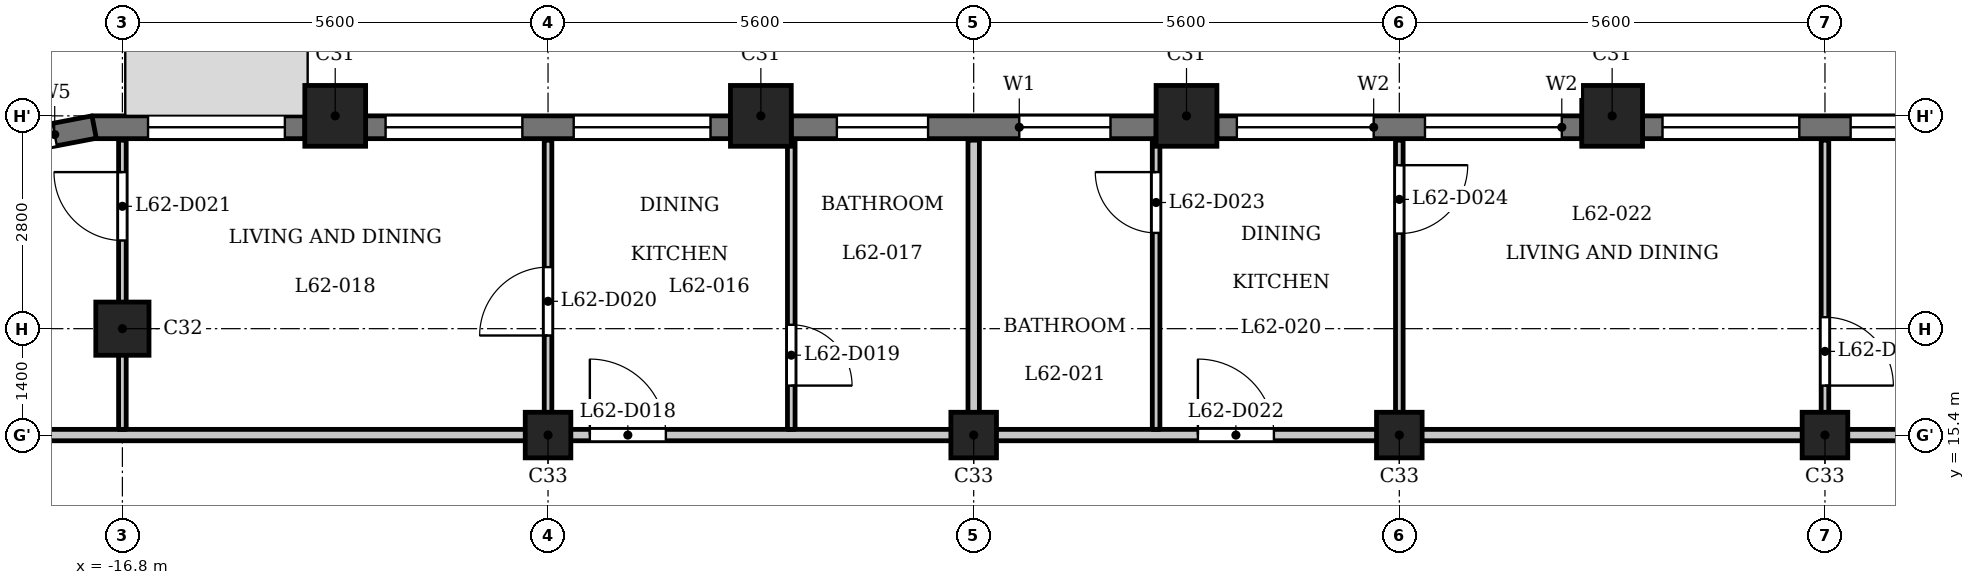
"""IFC4 building model, lengths in metres.
Left out: names, types, materials, properties, quantities, classifications, styles, units other than length and angle.
Written with IfcOpenShell. Run it as: python <this file> out.ifc"""

import sys

from ifc_helpers import new_model, si_unit, direction, frame, frame_2d, origin, origin_2d, place, context, subcontext, project, spatial, rectangle, extrude, element, fill, save


model = new_model("IFC4")
c1 = context("Model", 3, precision=1e-05, world=origin(), true_north=direction((0.0, 1.0)))
c2 = subcontext(c1, "Body", "Model", "MODEL_VIEW")
j1 = project(units=[si_unit("LENGTHUNIT", "METRE"), si_unit("PLANEANGLEUNIT", "RADIAN")], contexts=[c1])
p1 = place(None, origin())
s1 = spatial("IfcSite", under=j1, at=p1, CompositionType="ELEMENT")
p2 = place(p1, origin())
s2 = spatial("IfcBuilding", under=s1, at=p2, CompositionType="ELEMENT")
p3 = place(p2, frame((0.0, 0.0, 241.7)))
s3 = spatial("IfcBuildingStorey", under=s2, at=p3, CompositionType="ELEMENT", Elevation=241.7)
for number, where, z_axis, x_axis in (
    (1, (2.8, 19.6, 0.0), (0.0, 0.0, 1.0), (1.0, 0.0, 0.0)),
    (2, (-2.8, 19.6, 0.0), (0.0, 0.0, 1.0), (1.0, 0.0, 0.0)),
    (3, (-8.4, 19.6, 0.0), (0.0, 0.0, 1.0), (1.0, 0.0, 0.0)),
    (4, (-14.0, 19.6, 0.0), (0.0, 0.0, 1.0), (1.0, 0.0, 0.0)),
):
    element("IfcColumn", number, at=place(p3, frame(where, z_axis=z_axis, x_axis=x_axis)), inside=s3, PredefinedType="COLUMN", context=c2, shape_type="SweptSolid", body=[
        extrude(rectangle(XDim=0.8, YDim=0.8, at=origin_2d()), origin(), (0.0, 0.0, 1.0), 3.5),
    ])
p4 = place(p3, frame((-16.8, 16.8, 0.0), z_axis=(0.0, 0.0, 1.0), x_axis=(1.0, 0.0, 0.0)))
e5 = element("IfcColumn", 5, at=p4, inside=s3, PredefinedType="COLUMN", context=c2, shape_type="SweptSolid", body=[
    extrude(rectangle(XDim=0.7, YDim=0.7, at=origin_2d()), origin(), (0.0, 0.0, 1.0), 3.5),
])
for number, where, z_axis, x_axis in (
    (6, (-11.2, 15.4, 0.0), (0.0, 0.0, 1.0), (1.0, 0.0, 0.0)),
    (7, (-5.6, 15.4, 0.0), (0.0, 0.0, 1.0), (1.0, 0.0, 0.0)),
    (8, (0.0, 15.4, 0.0), (0.0, 0.0, 1.0), (1.0, 0.0, 0.0)),
    (9, (5.6, 15.4, 0.0), (0.0, 0.0, 1.0), (1.0, 0.0, 0.0)),
):
    element("IfcColumn", number, at=place(p3, frame(where, z_axis=z_axis, x_axis=x_axis)), inside=s3, PredefinedType="COLUMN", context=c2, shape_type="SweptSolid", body=[
        extrude(rectangle(XDim=0.6, YDim=0.6, at=origin_2d()), origin(), (0.0, 0.0, 1.0), 3.5),
    ])
p5 = place(p3, frame((8.0, 19.45, 0.0), z_axis=(0.0, 0.0, 1.0), x_axis=(-1.0, 0.0, 0.0)))
e10 = element("IfcWall", 10, at=p5, inside=s3, PredefinedType="SOLIDWALL", context=c2, shape_type="SweptSolid", body=[
    extrude(rectangle(XDim=4.8, YDim=0.3, at=frame_2d((2.4, 0.0))), origin(), (0.0, 0.0, 1.0), 2.55),
])
p6 = place(p5, frame((0.262, 0.0, 0.9)))
e11 = element("IfcOpeningElement", 11, at=p6, cuts=e10, PredefinedType="OPENING", context=c2, shape_type="SweptSolid", body=[
    extrude(rectangle(XDim=1.8, YDim=1.25, at=frame_2d((0.9, 0.625))), frame((0.0, 0.16, 0.0), z_axis=(0.0, -1.0, 0.0), x_axis=(1.0, 0.0, 0.0)), (0.0, 0.0, 1.0), 0.32),
])
p7 = place(p5, frame((2.738, 0.0, 0.9)))
e12 = element("IfcOpeningElement", 12, at=p7, cuts=e10, PredefinedType="OPENING", context=c2, shape_type="SweptSolid", body=[
    extrude(rectangle(XDim=1.8, YDim=1.25, at=frame_2d((0.9, 0.625))), frame((0.0, 0.16, 0.0), z_axis=(0.0, -1.0, 0.0), x_axis=(1.0, 0.0, 0.0)), (0.0, 0.0, 1.0), 0.32),
])
p8 = place(p3, frame((2.4, 19.45, 0.0), z_axis=(0.0, 0.0, 1.0), x_axis=(-1.0, 0.0, 0.0)))
e13 = element("IfcWall", 13, at=p8, inside=s3, PredefinedType="SOLIDWALL", context=c2, shape_type="SweptSolid", body=[
    extrude(rectangle(XDim=4.8, YDim=0.3, at=frame_2d((2.4, 0.0))), origin(), (0.0, 0.0, 1.0), 2.55),
])
p9 = place(p8, frame((0.262, 0.0, 0.9)))
e14 = element("IfcOpeningElement", 14, at=p9, cuts=e13, PredefinedType="OPENING", context=c2, shape_type="SweptSolid", body=[
    extrude(rectangle(XDim=1.8, YDim=1.25, at=frame_2d((0.9, 0.625))), frame((0.0, 0.16, 0.0), z_axis=(0.0, -1.0, 0.0), x_axis=(1.0, 0.0, 0.0)), (0.0, 0.0, 1.0), 0.32),
])
p10 = place(p8, frame((2.738, 0.0, 0.9)))
e15 = element("IfcOpeningElement", 15, at=p10, cuts=e13, PredefinedType="OPENING", context=c2, shape_type="SweptSolid", body=[
    extrude(rectangle(XDim=1.8, YDim=1.25, at=frame_2d((0.9, 0.625))), frame((0.0, 0.16, 0.0), z_axis=(0.0, -1.0, 0.0), x_axis=(1.0, 0.0, 0.0)), (0.0, 0.0, 1.0), 0.32),
])
p11 = place(p3, frame((-3.2, 19.45, 0.0), z_axis=(0.0, 0.0, 1.0), x_axis=(-1.0, 0.0, 0.0)))
e16 = element("IfcWall", 16, at=p11, inside=s3, PredefinedType="SOLIDWALL", context=c2, shape_type="SweptSolid", body=[
    extrude(rectangle(XDim=4.8, YDim=0.3, at=frame_2d((2.4, 0.0))), origin(), (0.0, 0.0, 1.0), 2.55),
])
p12 = place(p11, frame((0.6, 0.0, 0.6)))
e17 = element("IfcOpeningElement", 17, at=p12, cuts=e16, PredefinedType="OPENING", context=c2, shape_type="SweptSolid", body=[
    extrude(rectangle(XDim=1.2, YDim=1.55, at=frame_2d((0.6, 0.775))), frame((0.0, 0.16, 0.0), z_axis=(0.0, -1.0, 0.0), x_axis=(1.0, 0.0, 0.0)), (0.0, 0.0, 1.0), 0.32),
])
p13 = place(p11, frame((3.0, 0.0, 0.6)))
e18 = element("IfcOpeningElement", 18, at=p13, cuts=e16, PredefinedType="OPENING", context=c2, shape_type="SweptSolid", body=[
    extrude(rectangle(XDim=1.2, YDim=1.55, at=frame_2d((0.6, 0.775))), frame((0.0, 0.16, 0.0), z_axis=(0.0, -1.0, 0.0), x_axis=(1.0, 0.0, 0.0)), (0.0, 0.0, 1.0), 0.32),
])
p14 = place(p3, frame((-8.8, 19.45, 0.0), z_axis=(0.0, 0.0, 1.0), x_axis=(-1.0, 0.0, 0.0)))
e19 = element("IfcWall", 19, at=p14, inside=s3, PredefinedType="SOLIDWALL", context=c2, shape_type="SweptSolid", body=[
    extrude(rectangle(XDim=4.8, YDim=0.3, at=frame_2d((2.4, 0.0))), origin(), (0.0, 0.0, 1.0), 2.55),
])
p15 = place(p14, frame((0.262, 0.0, 0.9)))
e20 = element("IfcOpeningElement", 20, at=p15, cuts=e19, PredefinedType="OPENING", context=c2, shape_type="SweptSolid", body=[
    extrude(rectangle(XDim=1.8, YDim=1.25, at=frame_2d((0.9, 0.625))), frame((0.0, 0.16, 0.0), z_axis=(0.0, -1.0, 0.0), x_axis=(1.0, 0.0, 0.0)), (0.0, 0.0, 1.0), 0.32),
])
p16 = place(p14, frame((2.738, 0.0, 0.9)))
e21 = element("IfcOpeningElement", 21, at=p16, cuts=e19, PredefinedType="OPENING", context=c2, shape_type="SweptSolid", body=[
    extrude(rectangle(XDim=1.8, YDim=1.25, at=frame_2d((0.9, 0.625))), frame((0.0, 0.16, 0.0), z_axis=(0.0, -1.0, 0.0), x_axis=(1.0, 0.0, 0.0)), (0.0, 0.0, 1.0), 0.32),
])
p17 = place(p3, frame((-14.4, 19.45, 0.0), z_axis=(0.0, 0.0, 1.0), x_axis=(-1.0, 0.0, 0.0)))
e22 = element("IfcWall", 22, at=p17, inside=s3, PredefinedType="SOLIDWALL", context=c2, shape_type="SweptSolid", body=[
    extrude(rectangle(XDim=2.8, YDim=0.3, at=frame_2d((1.4, 0.0))), origin(), (0.0, 0.0, 1.0), 2.55),
])
p18 = place(p17, frame((0.262, 0.0, 0.9)))
e23 = element("IfcOpeningElement", 23, at=p18, cuts=e22, PredefinedType="OPENING", context=c2, shape_type="SweptSolid", body=[
    extrude(rectangle(XDim=1.8, YDim=1.25, at=frame_2d((0.9, 0.625))), frame((0.0, 0.16, 0.0), z_axis=(0.0, -1.0, 0.0), x_axis=(1.0, 0.0, 0.0)), (0.0, 0.0, 1.0), 0.32),
])
p19 = place(p3, frame((-17.172, 19.453, 0.0), z_axis=(0.0, 0.0, 1.0), x_axis=(-0.982301706131, -0.187305520826, 0.0)))
e24 = element("IfcWall", 24, at=p19, inside=s3, PredefinedType="SOLIDWALL", context=c2, shape_type="SweptSolid", body=[
    extrude(rectangle(XDim=1.856, YDim=0.3, at=frame_2d((0.928, 0.0))), origin(), (0.0, 0.0, 1.0), 2.55),
])
p20 = place(p19, frame((0.528, 0.0, 0.6)))
e25 = element("IfcOpeningElement", 25, at=p20, cuts=e24, PredefinedType="OPENING", context=c2, shape_type="SweptSolid", body=[
    extrude(rectangle(XDim=0.8, YDim=1.55, at=frame_2d((0.4, 0.775))), frame((0.0, 0.16, 0.0), z_axis=(0.0, -1.0, 0.0), x_axis=(1.0, 0.0, 0.0)), (0.0, 0.0, 1.0), 0.32),
])
p21 = place(p3, frame((-23.55, 15.4, 0.0), z_axis=(0.0, 0.0, 1.0), x_axis=(1.0, 0.0, 0.0)))
e26 = element("IfcWall", 26, at=p21, inside=s3, PredefinedType="PARTITIONING", context=c2, shape_type="SweptSolid", body=[
    extrude(rectangle(XDim=46.872, YDim=0.15, at=frame_2d((23.436, 0.0))), origin(), (0.0, 0.0, 1.0), 3.2),
])
p22 = place(p21, frame((12.9, 0.0, 0.0)))
e27 = element("IfcOpeningElement", 27, at=p22, cuts=e26, PredefinedType="OPENING", context=c2, shape_type="SweptSolid", body=[
    extrude(rectangle(XDim=1.0, YDim=2.1, at=frame_2d((0.5, 1.05))), frame((0.0, 0.085, 0.0), z_axis=(0.0, -1.0, 0.0), x_axis=(1.0, 0.0, 0.0)), (0.0, 0.0, 1.0), 0.17),
])
p23 = place(p21, frame((20.9, 0.0, 0.0)))
e28 = element("IfcOpeningElement", 28, at=p23, cuts=e26, PredefinedType="OPENING", context=c2, shape_type="SweptSolid", body=[
    extrude(rectangle(XDim=1.0, YDim=2.1, at=frame_2d((0.5, 1.05))), frame((0.0, 0.085, 0.0), z_axis=(0.0, -1.0, 0.0), x_axis=(1.0, 0.0, 0.0)), (0.0, 0.0, 1.0), 0.17),
])
p24 = place(p21, frame((37.7, 0.0, 0.0)))
e29 = element("IfcOpeningElement", 29, at=p24, cuts=e26, PredefinedType="OPENING", context=c2, shape_type="SweptSolid", body=[
    extrude(rectangle(XDim=1.0, YDim=2.1, at=frame_2d((0.5, 1.05))), frame((0.0, 0.085, 0.0), z_axis=(0.0, -1.0, 0.0), x_axis=(1.0, 0.0, 0.0)), (0.0, 0.0, 1.0), 0.17),
])
p25 = place(p3, frame((-16.8, 15.475, 0.0), z_axis=(0.0, 0.0, 1.0), x_axis=(0.0, 1.0, 0.0)))
e30 = element("IfcWall", 30, at=p25, inside=s3, PredefinedType="PARTITIONING", context=c2, shape_type="SweptSolid", body=[
    extrude(rectangle(XDim=3.805, YDim=0.1, at=frame_2d((1.902, 0.0))), origin(), (0.0, 0.0, 1.0), 3.2),
])
p26 = place(p25, frame((2.485, 0.0, 0.0)))
e31 = element("IfcOpeningElement", 31, at=p26, cuts=e30, PredefinedType="OPENING", context=c2, shape_type="SweptSolid", body=[
    extrude(rectangle(XDim=0.9, YDim=2.1, at=frame_2d((0.45, 1.05))), frame((0.0, 0.06, 0.0), z_axis=(0.0, -1.0, 0.0), x_axis=(1.0, 0.0, 0.0)), (0.0, 0.0, 1.0), 0.12),
])
p27 = place(p3, frame((-11.2, 15.475, 0.0), z_axis=(0.0, 0.0, 1.0), x_axis=(0.0, 1.0, 0.0)))
e32 = element("IfcWall", 32, at=p27, inside=s3, PredefinedType="PARTITIONING", context=c2, shape_type="SweptSolid", body=[
    extrude(rectangle(XDim=3.805, YDim=0.1, at=frame_2d((1.902, 0.0))), origin(), (0.0, 0.0, 1.0), 3.2),
])
p28 = place(p27, frame((1.235, 0.0, 0.0)))
e33 = element("IfcOpeningElement", 33, at=p28, cuts=e32, PredefinedType="OPENING", context=c2, shape_type="SweptSolid", body=[
    extrude(rectangle(XDim=0.9, YDim=2.1, at=frame_2d((0.45, 1.05))), frame((0.0, 0.06, 0.0), z_axis=(0.0, -1.0, 0.0), x_axis=(1.0, 0.0, 0.0)), (0.0, 0.0, 1.0), 0.12),
])
p29 = place(p3, frame((-8.0, 15.475, 0.0), z_axis=(0.0, 0.0, 1.0), x_axis=(0.0, 1.0, 0.0)))
e34 = element("IfcWall", 34, at=p29, inside=s3, PredefinedType="PARTITIONING", context=c2, shape_type="SweptSolid", body=[
    extrude(rectangle(XDim=3.805, YDim=0.1, at=frame_2d((1.902, 0.0))), origin(), (0.0, 0.0, 1.0), 3.2),
])
p30 = place(p29, frame((0.576, 0.0, 0.0)))
e35 = element("IfcOpeningElement", 35, at=p30, cuts=e34, PredefinedType="OPENING", context=c2, shape_type="SweptSolid", body=[
    extrude(rectangle(XDim=0.8, YDim=2.1, at=frame_2d((0.4, 1.05))), frame((0.0, 0.06, 0.0), z_axis=(0.0, -1.0, 0.0), x_axis=(1.0, 0.0, 0.0)), (0.0, 0.0, 1.0), 0.12),
])
p31 = place(p3, frame((-5.6, 15.475, 0.0), z_axis=(0.0, 0.0, 1.0), x_axis=(0.0, 1.0, 0.0)))
e36 = element("IfcWall", 36, at=p31, inside=s3, PredefinedType="PARTITIONING", context=c2, shape_type="SweptSolid", body=[
    extrude(rectangle(XDim=3.805, YDim=0.15, at=frame_2d((1.902, 0.0))), origin(), (0.0, 0.0, 1.0), 3.2),
])
p32 = place(p3, frame((-3.2, 15.475, 0.0), z_axis=(0.0, 0.0, 1.0), x_axis=(0.0, 1.0, 0.0)))
e37 = element("IfcWall", 37, at=p32, inside=s3, PredefinedType="PARTITIONING", context=c2, shape_type="SweptSolid", body=[
    extrude(rectangle(XDim=3.805, YDim=0.1, at=frame_2d((1.902, 0.0))), origin(), (0.0, 0.0, 1.0), 3.2),
])
p33 = place(p32, frame((2.585, 0.0, 0.0)))
e38 = element("IfcOpeningElement", 38, at=p33, cuts=e37, PredefinedType="OPENING", context=c2, shape_type="SweptSolid", body=[
    extrude(rectangle(XDim=0.8, YDim=2.1, at=frame_2d((0.4, 1.05))), frame((0.0, 0.06, 0.0), z_axis=(0.0, -1.0, 0.0), x_axis=(1.0, 0.0, 0.0)), (0.0, 0.0, 1.0), 0.12),
])
p34 = place(p3, frame((0.0, 15.475, 0.0), z_axis=(0.0, 0.0, 1.0), x_axis=(0.0, 1.0, 0.0)))
e39 = element("IfcWall", 39, at=p34, inside=s3, PredefinedType="PARTITIONING", context=c2, shape_type="SweptSolid", body=[
    extrude(rectangle(XDim=3.805, YDim=0.1, at=frame_2d((1.902, 0.0))), origin(), (0.0, 0.0, 1.0), 3.2),
])
p35 = place(p34, frame((2.576, 0.0, 0.0)))
e40 = element("IfcOpeningElement", 40, at=p35, cuts=e39, PredefinedType="OPENING", context=c2, shape_type="SweptSolid", body=[
    extrude(rectangle(XDim=0.9, YDim=2.1, at=frame_2d((0.45, 1.05))), frame((0.0, 0.06, 0.0), z_axis=(0.0, -1.0, 0.0), x_axis=(1.0, 0.0, 0.0)), (0.0, 0.0, 1.0), 0.12),
])
p36 = place(p3, frame((5.6, 15.475, 0.0), z_axis=(0.0, 0.0, 1.0), x_axis=(0.0, 1.0, 0.0)))
e41 = element("IfcWall", 41, at=p36, inside=s3, PredefinedType="PARTITIONING", context=c2, shape_type="SweptSolid", body=[
    extrude(rectangle(XDim=3.805, YDim=0.1, at=frame_2d((1.902, 0.0))), origin(), (0.0, 0.0, 1.0), 3.2),
])
p37 = place(p36, frame((0.576, 0.0, 0.0)))
e42 = element("IfcOpeningElement", 42, at=p37, cuts=e41, PredefinedType="OPENING", context=c2, shape_type="SweptSolid", body=[
    extrude(rectangle(XDim=0.9, YDim=2.1, at=frame_2d((0.45, 1.05))), frame((0.0, 0.06, 0.0), z_axis=(0.0, -1.0, 0.0), x_axis=(1.0, 0.0, 0.0)), (0.0, 0.0, 1.0), 0.12),
])
p38 = place(p22, origin())
e43 = element("IfcDoor", 43, at=p38, inside=s3, OperationType="SINGLE_SWING_RIGHT", PredefinedType="DOOR", context=c2, shape_type="SweptSolid", body=[
    extrude(rectangle(XDim=1.0, YDim=2.1, at=frame_2d((0.5, 1.05))), frame((0.0, 0.025, 0.0), z_axis=(0.0, -1.0, 0.0), x_axis=(1.0, 0.0, 0.0)), (0.0, 0.0, 1.0), 0.05),
])
fill(e27, e43)
p39 = place(p30, origin())
e44 = element("IfcDoor", 44, at=p39, inside=s3, OperationType="SINGLE_SWING_LEFT", PredefinedType="DOOR", context=c2, shape_type="SweptSolid", body=[
    extrude(rectangle(XDim=0.8, YDim=2.1, at=frame_2d((0.4, 1.05))), frame((0.0, 0.025, 0.0), z_axis=(0.0, -1.0, 0.0), x_axis=(1.0, 0.0, 0.0)), (0.0, 0.0, 1.0), 0.05),
])
fill(e35, e44)
p40 = place(p28, origin())
e45 = element("IfcDoor", 45, at=p40, inside=s3, OperationType="SINGLE_SWING_RIGHT", PredefinedType="DOOR", context=c2, shape_type="SweptSolid", body=[
    extrude(rectangle(XDim=0.9, YDim=2.1, at=frame_2d((0.45, 1.05))), frame((0.0, 0.025, 0.0), z_axis=(0.0, -1.0, 0.0), x_axis=(1.0, 0.0, 0.0)), (0.0, 0.0, 1.0), 0.05),
])
fill(e33, e45)
p41 = place(p26, origin())
e46 = element("IfcDoor", 46, at=p41, inside=s3, OperationType="SINGLE_SWING_LEFT", PredefinedType="DOOR", context=c2, shape_type="SweptSolid", body=[
    extrude(rectangle(XDim=0.9, YDim=2.1, at=frame_2d((0.45, 1.05))), frame((0.0, 0.025, 0.0), z_axis=(0.0, -1.0, 0.0), x_axis=(1.0, 0.0, 0.0)), (0.0, 0.0, 1.0), 0.05),
])
fill(e31, e46)
p42 = place(p23, origin())
e47 = element("IfcDoor", 47, at=p42, inside=s3, OperationType="SINGLE_SWING_RIGHT", PredefinedType="DOOR", context=c2, shape_type="SweptSolid", body=[
    extrude(rectangle(XDim=1.0, YDim=2.1, at=frame_2d((0.5, 1.05))), frame((0.0, 0.025, 0.0), z_axis=(0.0, -1.0, 0.0), x_axis=(1.0, 0.0, 0.0)), (0.0, 0.0, 1.0), 0.05),
])
fill(e28, e47)
p43 = place(p33, origin())
e48 = element("IfcDoor", 48, at=p43, inside=s3, OperationType="SINGLE_SWING_LEFT", PredefinedType="DOOR", context=c2, shape_type="SweptSolid", body=[
    extrude(rectangle(XDim=0.8, YDim=2.1, at=frame_2d((0.4, 1.05))), frame((0.0, 0.025, 0.0), z_axis=(0.0, -1.0, 0.0), x_axis=(1.0, 0.0, 0.0)), (0.0, 0.0, 1.0), 0.05),
])
fill(e38, e48)
p44 = place(p35, origin())
e49 = element("IfcDoor", 49, at=p44, inside=s3, OperationType="SINGLE_SWING_RIGHT", PredefinedType="DOOR", context=c2, shape_type="SweptSolid", body=[
    extrude(rectangle(XDim=0.9, YDim=2.1, at=frame_2d((0.45, 1.05))), frame((0.0, 0.025, 0.0), z_axis=(0.0, -1.0, 0.0), x_axis=(1.0, 0.0, 0.0)), (0.0, 0.0, 1.0), 0.05),
])
fill(e40, e49)
p45 = place(p37, origin())
e50 = element("IfcDoor", 50, at=p45, inside=s3, OperationType="SINGLE_SWING_LEFT", PredefinedType="DOOR", context=c2, shape_type="SweptSolid", body=[
    extrude(rectangle(XDim=0.9, YDim=2.1, at=frame_2d((0.45, 1.05))), frame((0.0, 0.025, 0.0), z_axis=(0.0, -1.0, 0.0), x_axis=(1.0, 0.0, 0.0)), (0.0, 0.0, 1.0), 0.05),
])
fill(e42, e50)
p46 = place(p6, origin())
e51 = element("IfcWindow", 51, at=p46, inside=s3, PartitioningType="SINGLE_PANEL", PredefinedType="WINDOW", context=c2, shape_type="SweptSolid", body=[
    extrude(rectangle(XDim=1.8, YDim=1.25, at=frame_2d((0.9, 0.625))), frame((0.0, 0.03, 0.0), z_axis=(0.0, -1.0, 0.0), x_axis=(1.0, 0.0, 0.0)), (0.0, 0.0, 1.0), 0.06),
])
fill(e11, e51)
p47 = place(p7, origin())
e52 = element("IfcWindow", 52, at=p47, inside=s3, PartitioningType="SINGLE_PANEL", PredefinedType="WINDOW", context=c2, shape_type="SweptSolid", body=[
    extrude(rectangle(XDim=1.8, YDim=1.25, at=frame_2d((0.9, 0.625))), frame((0.0, 0.03, 0.0), z_axis=(0.0, -1.0, 0.0), x_axis=(1.0, 0.0, 0.0)), (0.0, 0.0, 1.0), 0.06),
])
fill(e12, e52)
p48 = place(p9, origin())
e53 = element("IfcWindow", 53, at=p48, inside=s3, PartitioningType="SINGLE_PANEL", PredefinedType="WINDOW", context=c2, shape_type="SweptSolid", body=[
    extrude(rectangle(XDim=1.8, YDim=1.25, at=frame_2d((0.9, 0.625))), frame((0.0, 0.03, 0.0), z_axis=(0.0, -1.0, 0.0), x_axis=(1.0, 0.0, 0.0)), (0.0, 0.0, 1.0), 0.06),
])
fill(e14, e53)
p49 = place(p10, origin())
e54 = element("IfcWindow", 54, at=p49, inside=s3, PartitioningType="SINGLE_PANEL", PredefinedType="WINDOW", context=c2, shape_type="SweptSolid", body=[
    extrude(rectangle(XDim=1.8, YDim=1.25, at=frame_2d((0.9, 0.625))), frame((0.0, 0.03, 0.0), z_axis=(0.0, -1.0, 0.0), x_axis=(1.0, 0.0, 0.0)), (0.0, 0.0, 1.0), 0.06),
])
fill(e15, e54)
p50 = place(p12, origin())
e55 = element("IfcWindow", 55, at=p50, inside=s3, PartitioningType="SINGLE_PANEL", PredefinedType="WINDOW", context=c2, shape_type="SweptSolid", body=[
    extrude(rectangle(XDim=1.2, YDim=1.55, at=frame_2d((0.6, 0.775))), frame((0.0, 0.03, 0.0), z_axis=(0.0, -1.0, 0.0), x_axis=(1.0, 0.0, 0.0)), (0.0, 0.0, 1.0), 0.06),
])
fill(e17, e55)
p51 = place(p13, origin())
e56 = element("IfcWindow", 56, at=p51, inside=s3, PartitioningType="SINGLE_PANEL", PredefinedType="WINDOW", context=c2, shape_type="SweptSolid", body=[
    extrude(rectangle(XDim=1.2, YDim=1.55, at=frame_2d((0.6, 0.775))), frame((0.0, 0.03, 0.0), z_axis=(0.0, -1.0, 0.0), x_axis=(1.0, 0.0, 0.0)), (0.0, 0.0, 1.0), 0.06),
])
fill(e18, e56)
p52 = place(p15, origin())
e57 = element("IfcWindow", 57, at=p52, inside=s3, PartitioningType="SINGLE_PANEL", PredefinedType="WINDOW", context=c2, shape_type="SweptSolid", body=[
    extrude(rectangle(XDim=1.8, YDim=1.25, at=frame_2d((0.9, 0.625))), frame((0.0, 0.03, 0.0), z_axis=(0.0, -1.0, 0.0), x_axis=(1.0, 0.0, 0.0)), (0.0, 0.0, 1.0), 0.06),
])
fill(e20, e57)
p53 = place(p16, origin())
e58 = element("IfcWindow", 58, at=p53, inside=s3, PartitioningType="SINGLE_PANEL", PredefinedType="WINDOW", context=c2, shape_type="SweptSolid", body=[
    extrude(rectangle(XDim=1.8, YDim=1.25, at=frame_2d((0.9, 0.625))), frame((0.0, 0.03, 0.0), z_axis=(0.0, -1.0, 0.0), x_axis=(1.0, 0.0, 0.0)), (0.0, 0.0, 1.0), 0.06),
])
fill(e21, e58)
p54 = place(p18, origin())
e59 = element("IfcWindow", 59, at=p54, inside=s3, PartitioningType="SINGLE_PANEL", PredefinedType="WINDOW", context=c2, shape_type="SweptSolid", body=[
    extrude(rectangle(XDim=1.8, YDim=1.25, at=frame_2d((0.9, 0.625))), frame((0.0, 0.03, 0.0), z_axis=(0.0, -1.0, 0.0), x_axis=(1.0, 0.0, 0.0)), (0.0, 0.0, 1.0), 0.06),
])
fill(e23, e59)
p55 = place(p20, origin())
e60 = element("IfcWindow", 60, at=p55, inside=s3, PartitioningType="SINGLE_PANEL", PredefinedType="WINDOW", context=c2, shape_type="SweptSolid", body=[
    extrude(rectangle(XDim=0.8, YDim=1.55, at=frame_2d((0.4, 0.775))), frame((0.0, 0.03, 0.0), z_axis=(0.0, -1.0, 0.0), x_axis=(1.0, 0.0, 0.0)), (0.0, 0.0, 1.0), 0.06),
])
fill(e25, e60)
save(model, sys.argv[1])
